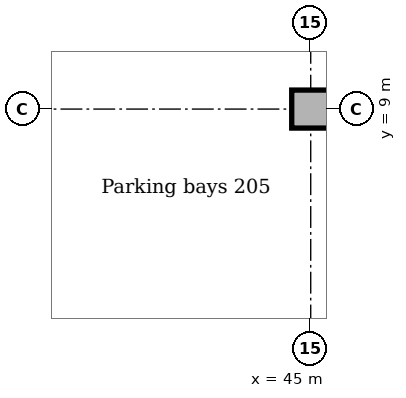
"""IFC4 building model, lengths in metres.
Left out: names, types, materials, properties, quantities, classifications, styles, units other than length and angle.
Written with IfcOpenShell. Run it as: python <this file> out.ifc"""

import sys

from ifc_helpers import new_model, si_unit, direction, frame, origin, origin_2d, place, context, subcontext, project, spatial, rectangle, extrude, element, save


model = new_model("IFC4")
c1 = context("Model", 3, precision=1e-05, world=origin(), true_north=direction((0.0, 1.0)))
c2 = subcontext(c1, "Body", "Model", "MODEL_VIEW")
j1 = project(units=[si_unit("LENGTHUNIT", "METRE"), si_unit("PLANEANGLEUNIT", "RADIAN")], contexts=[c1])
p1 = place(None, origin())
s1 = spatial("IfcSite", under=j1, at=p1, CompositionType="ELEMENT")
p2 = place(p1, origin())
s2 = spatial("IfcBuilding", under=s1, at=p2, CompositionType="ELEMENT")
p3 = place(p2, frame((0.0, 0.0, -9.5)))
s3 = spatial("IfcBuildingStorey", under=s2, at=p3, CompositionType="ELEMENT", Elevation=-9.5)
p4 = place(p3, frame((45.0, 9.0, 0.0), z_axis=(0.0, 0.0, 1.0), x_axis=(1.0, 0.0, 0.0)))
e1 = element("IfcColumn", 1, at=p4, inside=s3, PredefinedType="COLUMN", context=c2, shape_type="SweptSolid", body=[
    extrude(rectangle(XDim=1.0, YDim=1.0, at=origin_2d()), origin(), (0.0, 0.0, 1.0), 4.15),
])
save(model, sys.argv[1])
